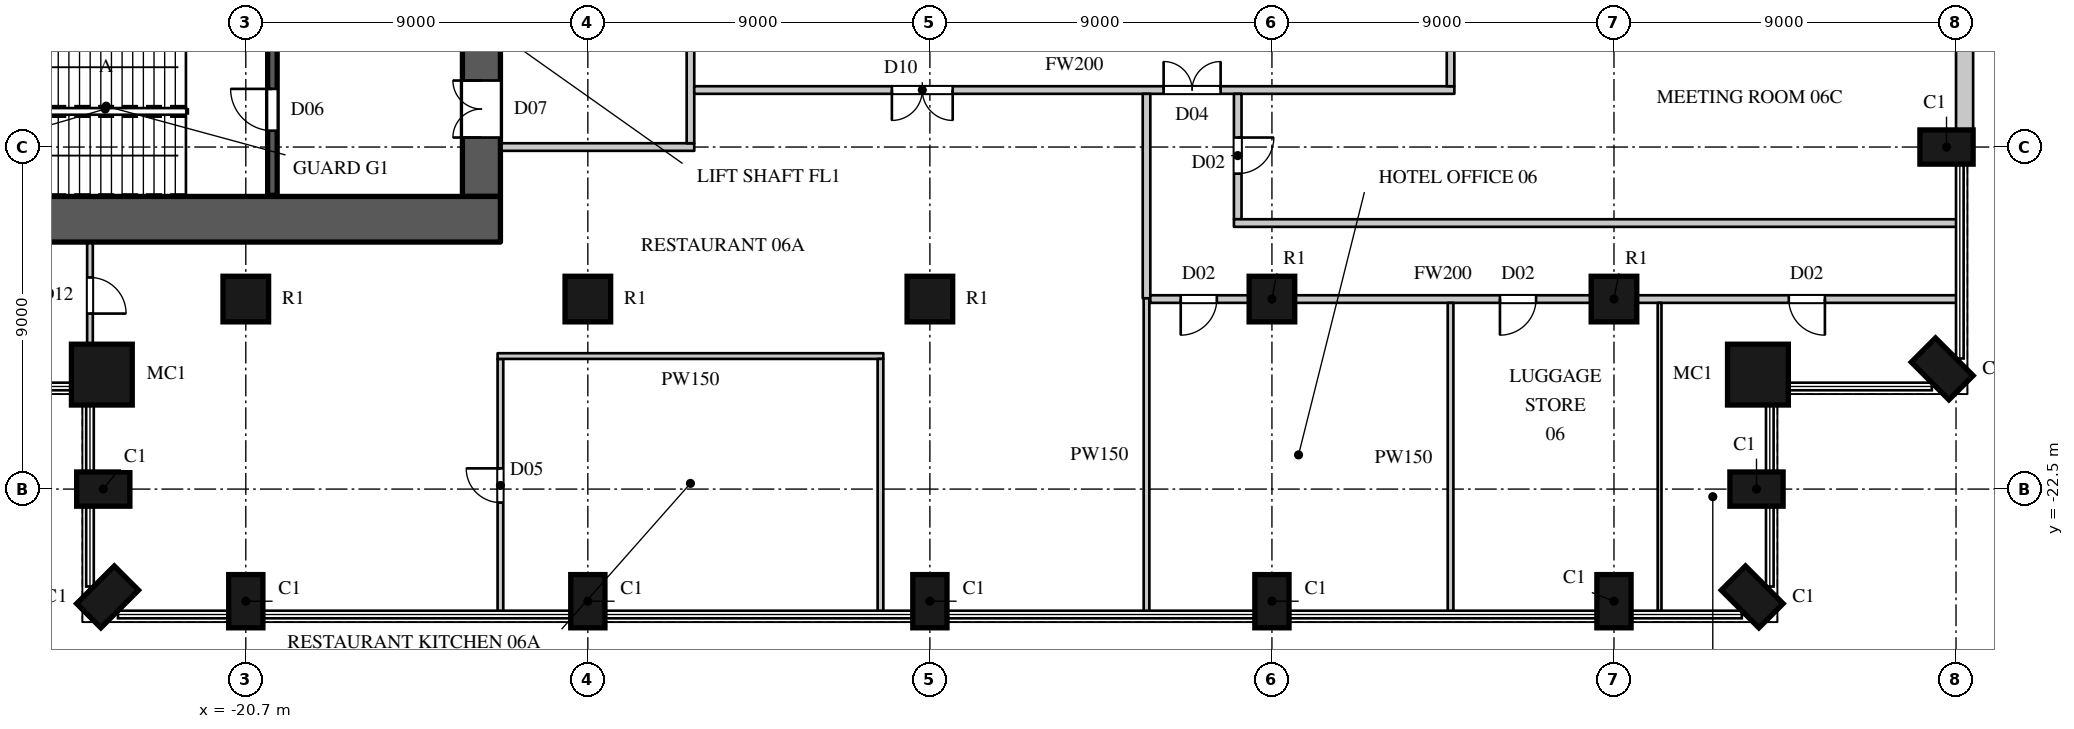
"""IFC4 building model, lengths in metres.
Left out: names, types, materials, properties, quantities, classifications, styles, units other than length and angle.
Written with IfcOpenShell. Run it as: python <this file> out.ifc"""

import sys

from ifc_helpers import new_model, si_unit, direction, frame, frame_2d, origin, origin_2d, place, context, subcontext, project, spatial, rectangle, circle, extrude, element, fill, save


model = new_model("IFC4")
c1 = context("Model", 3, precision=1e-05, world=origin(), true_north=direction((0.0, 1.0)))
c2 = subcontext(c1, "Body", "Model", "MODEL_VIEW")
j1 = project(units=[si_unit("LENGTHUNIT", "METRE"), si_unit("PLANEANGLEUNIT", "RADIAN")], contexts=[c1])
p1 = place(None, origin())
s1 = spatial("IfcSite", under=j1, at=p1, CompositionType="ELEMENT")
p2 = place(p1, origin())
s2 = spatial("IfcBuilding", under=s1, at=p2, CompositionType="ELEMENT")
p3 = place(p2, frame((0.0, 0.0, 50.0)))
s3 = spatial("IfcBuildingStorey", under=s2, at=p3, CompositionType="ELEMENT", Elevation=50.0)
p4 = place(p3, frame((-24.488, -19.488, 0.0), z_axis=(0.0, 0.0, 1.0), x_axis=(1.0, 0.0, 0.0)))
e1 = element("IfcColumn", 1, at=p4, inside=s3, PredefinedType="COLUMN", context=c2, shape_type="SweptSolid", body=[
    extrude(circle(Radius=0.8, at=origin_2d()), origin(), (0.0, 0.0, 1.0), 5.5),
])
for number, where, z_axis, x_axis in (
    (2, (-24.45, -22.5, 0.0), (0.0, 0.0, 1.0), (0.0, -1.0, 0.0)),
    (3, (-24.337, -25.337, 0.0), (0.0, 0.0, 1.0), (0.707, -0.707, 0.0)),
    (4, (-20.7, -25.45, 0.0), (0.0, 0.0, 1.0), (1.0, 0.0, 0.0)),
    (5, (-11.7, -25.45, 0.0), (0.0, 0.0, 1.0), (1.0, 0.0, 0.0)),
    (6, (-2.7, -25.45, 0.0), (0.0, 0.0, 1.0), (1.0, 0.0, 0.0)),
    (7, (6.3, -25.45, 0.0), (0.0, 0.0, 1.0), (1.0, 0.0, 0.0)),
    (8, (15.3, -25.45, 0.0), (0.0, 0.0, 1.0), (1.0, 0.0, 0.0)),
    (9, (18.937, -25.337, 0.0), (0.0, 0.0, 1.0), (0.707, 0.707, 0.0)),
    (10, (19.05, -22.5, 0.0), (0.0, 0.0, 1.0), (0.0, 1.0, 0.0)),
):
    element("IfcColumn", number, at=place(p3, frame(where, z_axis=z_axis, x_axis=x_axis)), inside=s3, PredefinedType="COLUMN", context=c2, shape_type="SweptSolid", body=[
        extrude(rectangle(XDim=0.9, YDim=1.4, at=origin_2d()), origin(), (0.0, 0.0, 1.0), 5.5),
    ])
p5 = place(p3, frame((19.088, -19.488, 0.0), z_axis=(0.0, 0.0, 1.0), x_axis=(1.0, 0.0, 0.0)))
e11 = element("IfcColumn", 11, at=p5, inside=s3, PredefinedType="COLUMN", context=c2, shape_type="SweptSolid", body=[
    extrude(circle(Radius=0.8, at=origin_2d()), origin(), (0.0, 0.0, 1.0), 5.5),
])
for number, where, z_axis, x_axis in (
    (12, (23.937, -19.337, 0.0), (0.0, 0.0, 1.0), (0.707, 0.707, 0.0)),
    (13, (24.05, -13.5, 0.0), (0.0, 0.0, 1.0), (0.0, 1.0, 0.0)),
):
    element("IfcColumn", number, at=place(p3, frame(where, z_axis=z_axis, x_axis=x_axis)), inside=s3, PredefinedType="COLUMN", context=c2, shape_type="SweptSolid", body=[
        extrude(rectangle(XDim=0.9, YDim=1.4, at=origin_2d()), origin(), (0.0, 0.0, 1.0), 5.5),
    ])
for number, where, z_axis, x_axis in (
    (14, (-20.7, -17.5, 0.0), (0.0, 0.0, 1.0), (1.0, 0.0, 0.0)),
    (15, (-11.7, -17.5, 0.0), (0.0, 0.0, 1.0), (1.0, 0.0, 0.0)),
    (16, (-2.7, -17.5, 0.0), (0.0, 0.0, 1.0), (1.0, 0.0, 0.0)),
    (17, (6.3, -17.5, 0.0), (0.0, 0.0, 1.0), (1.0, 0.0, 0.0)),
    (18, (15.3, -17.5, 0.0), (0.0, 0.0, 1.0), (1.0, 0.0, 0.0)),
):
    element("IfcColumn", number, at=place(p3, frame(where, z_axis=z_axis, x_axis=x_axis)), inside=s3, PredefinedType="COLUMN", context=c2, shape_type="SweptSolid", body=[
        extrude(circle(Radius=0.6, at=origin_2d()), origin(), (0.0, 0.0, 1.0), 5.5),
    ])
p6 = place(p3, frame((24.525, -13.05, 0.0), z_axis=(0.0, 0.0, 1.0), x_axis=(0.0, 1.0, 0.0)))
e19 = element("IfcWall", 19, at=p6, inside=s3, PredefinedType="SOLIDWALL", context=c2, shape_type="SweptSolid", body=[
    extrude(rectangle(XDim=8.1, YDim=0.45, at=frame_2d((4.05, 0.0))), origin(), (0.0, 0.0, 1.0), 5.2),
])
p7 = place(p6, frame((6.65, 0.0, 0.0)))
e20 = element("IfcOpeningElement", 20, at=p7, cuts=e19, PredefinedType="OPENING", context=c2, shape_type="SweptSolid", body=[
    extrude(rectangle(XDim=1.1, YDim=2.4, at=frame_2d((0.55, 1.2))), frame((0.0, 0.235, 0.0), z_axis=(0.0, -1.0, 0.0), x_axis=(1.0, 0.0, 0.0)), (0.0, 0.0, 1.0), 0.47),
])
p8 = place(p3, frame((-30.0, -15.4, 0.0), z_axis=(0.0, 0.0, 1.0), x_axis=(1.0, 0.0, 0.0)))
e21 = element("IfcWall", 21, at=p8, inside=s3, PredefinedType="SHEAR", context=c2, shape_type="SweptSolid", body=[
    extrude(rectangle(XDim=16.0, YDim=1.2, at=frame_2d((8.0, 0.0))), origin(), (0.0, 0.0, 1.0), 5.5),
])
p9 = place(p3, frame((-14.5, -14.8, 0.0), z_axis=(0.0, 0.0, 1.0), x_axis=(0.0, 1.0, 0.0)))
e22 = element("IfcWall", 22, at=p9, inside=s3, PredefinedType="SHEAR", context=c2, shape_type="SweptSolid", body=[
    extrude(rectangle(XDim=29.6, YDim=1.0, at=frame_2d((14.8, 0.0))), origin(), (0.0, 0.0, 1.0), 5.5),
])
p10 = place(p9, frame((1.55, 0.0, 0.0)))
e23 = element("IfcOpeningElement", 23, at=p10, cuts=e22, PredefinedType="OPENING", context=c2, shape_type="SweptSolid", body=[
    extrude(rectangle(XDim=1.5, YDim=2.4, at=frame_2d((0.75, 1.2))), frame((0.0, 0.51, 0.0), z_axis=(0.0, -1.0, 0.0), x_axis=(1.0, 0.0, 0.0)), (0.0, 0.0, 1.0), 1.02),
])
p11 = place(p9, frame((26.55, 0.0, 0.0)))
e24 = element("IfcOpeningElement", 24, at=p11, cuts=e22, PredefinedType="OPENING", context=c2, shape_type="SweptSolid", body=[
    extrude(rectangle(XDim=1.5, YDim=2.4, at=frame_2d((0.75, 1.2))), frame((0.0, 0.51, 0.0), z_axis=(0.0, -1.0, 0.0), x_axis=(1.0, 0.0, 0.0)), (0.0, 0.0, 1.0), 1.02),
])
p12 = place(p9, frame((8.45, 0.0, 0.0)))
e25 = element("IfcOpeningElement", 25, at=p12, cuts=e22, PredefinedType="OPENING", context=c2, shape_type="SweptSolid", body=[
    extrude(rectangle(XDim=1.5, YDim=2.4, at=frame_2d((0.75, 1.2))), frame((0.0, 0.51, 0.0), z_axis=(0.0, -1.0, 0.0), x_axis=(1.0, 0.0, 0.0)), (0.0, 0.0, 1.0), 1.02),
])
p13 = place(p9, frame((19.65, 0.0, 0.0)))
e26 = element("IfcOpeningElement", 26, at=p13, cuts=e22, PredefinedType="OPENING", context=c2, shape_type="SweptSolid", body=[
    extrude(rectangle(XDim=1.5, YDim=2.4, at=frame_2d((0.75, 1.2))), frame((0.0, 0.51, 0.0), z_axis=(0.0, -1.0, 0.0), x_axis=(1.0, 0.0, 0.0)), (0.0, 0.0, 1.0), 1.02),
])
p14 = place(p9, frame((14.5, 0.0, 0.0)))
e27 = element("IfcOpeningElement", 27, at=p14, cuts=e22, PredefinedType="OPENING", context=c2, shape_type="SweptSolid", body=[
    extrude(rectangle(XDim=0.6, YDim=2.0, at=frame_2d((0.3, 1.0))), frame((0.0, 0.51, 0.0), z_axis=(0.0, -1.0, 0.0), x_axis=(1.0, 0.0, 0.0)), (0.0, 0.0, 1.0), 1.02),
])
p15 = place(p3, frame((-13.97, -13.5, 0.0), z_axis=(0.0, 0.0, 1.0), x_axis=(1.0, 0.0, 0.0)))
e28 = element("IfcWall", 28, at=p15, inside=s3, PredefinedType="PARTITIONING", context=c2, shape_type="SweptSolid", body=[
    extrude(rectangle(XDim=5.07, YDim=0.2, at=frame_2d((2.535, 0.0))), origin(), (0.0, 0.0, 1.0), 5.2),
])
p16 = place(p3, frame((-9.0, -13.4, 0.0), z_axis=(0.0, 0.0, 1.0), x_axis=(0.0, 1.0, 0.0)))
e29 = element("IfcWall", 29, at=p16, inside=s3, PredefinedType="PARTITIONING", context=c2, shape_type="SweptSolid", body=[
    extrude(rectangle(XDim=26.8, YDim=0.2, at=frame_2d((13.4, 0.0))), origin(), (0.0, 0.0, 1.0), 5.2),
])
p17 = place(p16, frame((12.6, 0.0, 0.0)))
e30 = element("IfcOpeningElement", 30, at=p17, cuts=e29, PredefinedType="OPENING", context=c2, shape_type="SweptSolid", body=[
    extrude(rectangle(XDim=1.6, YDim=2.4, at=frame_2d((0.8, 1.2))), frame((0.0, 0.11, 0.0), z_axis=(0.0, -1.0, 0.0), x_axis=(1.0, 0.0, 0.0)), (0.0, 0.0, 1.0), 0.22),
])
p18 = place(p3, frame((-8.9, -12.0, 0.0), z_axis=(0.0, 0.0, 1.0), x_axis=(1.0, 0.0, 0.0)))
e31 = element("IfcWall", 31, at=p18, inside=s3, PredefinedType="PARTITIONING", context=c2, shape_type="SweptSolid", body=[
    extrude(rectangle(XDim=20.0, YDim=0.2, at=frame_2d((10.0, 0.0))), origin(), (0.0, 0.0, 1.0), 5.2),
])
p19 = place(p18, frame((5.2, 0.0, 0.0)))
e32 = element("IfcOpeningElement", 32, at=p19, cuts=e31, PredefinedType="OPENING", context=c2, shape_type="SweptSolid", body=[
    extrude(rectangle(XDim=1.6, YDim=2.4, at=frame_2d((0.8, 1.2))), frame((0.0, 0.11, 0.0), z_axis=(0.0, -1.0, 0.0), x_axis=(1.0, 0.0, 0.0)), (0.0, 0.0, 1.0), 0.22),
])
p20 = place(p18, frame((12.35, 0.0, 0.0)))
e33 = element("IfcOpeningElement", 33, at=p20, cuts=e31, PredefinedType="OPENING", context=c2, shape_type="SweptSolid", body=[
    extrude(rectangle(XDim=1.5, YDim=2.2, at=frame_2d((0.75, 1.1))), frame((0.0, 0.11, 0.0), z_axis=(0.0, -1.0, 0.0), x_axis=(1.0, 0.0, 0.0)), (0.0, 0.0, 1.0), 0.22),
])
p21 = place(p3, frame((3.0, -17.48, 0.0), z_axis=(0.0, 0.0, 1.0), x_axis=(0.0, 1.0, 0.0)))
e34 = element("IfcWall", 34, at=p21, inside=s3, PredefinedType="PARTITIONING", context=c2, shape_type="SweptSolid", body=[
    extrude(rectangle(XDim=5.38, YDim=0.2, at=frame_2d((2.69, 0.0))), origin(), (0.0, 0.0, 1.0), 5.2),
])
p22 = place(p3, frame((3.1, -17.5, 0.0), z_axis=(0.0, 0.0, 1.0), x_axis=(1.0, 0.0, 0.0)))
e35 = element("IfcWall", 35, at=p22, inside=s3, PredefinedType="PARTITIONING", context=c2, shape_type="SweptSolid", body=[
    extrude(rectangle(XDim=2.6, YDim=0.2, at=frame_2d((1.3, 0.0))), origin(), (0.0, 0.0, 1.0), 4.65),
])
p23 = place(p22, frame((0.8, 0.0, 0.0)))
e36 = element("IfcOpeningElement", 36, at=p23, cuts=e35, PredefinedType="OPENING", context=c2, shape_type="SweptSolid", body=[
    extrude(rectangle(XDim=0.95, YDim=2.2, at=frame_2d((0.475, 1.1))), frame((0.0, 0.11, 0.0), z_axis=(0.0, -1.0, 0.0), x_axis=(1.0, 0.0, 0.0)), (0.0, 0.0, 1.0), 0.22),
])
p24 = place(p3, frame((6.9, -17.5, 0.0), z_axis=(0.0, 0.0, 1.0), x_axis=(1.0, 0.0, 0.0)))
e37 = element("IfcWall", 37, at=p24, inside=s3, PredefinedType="PARTITIONING", context=c2, shape_type="SweptSolid", body=[
    extrude(rectangle(XDim=7.8, YDim=0.2, at=frame_2d((3.9, 0.0))), origin(), (0.0, 0.0, 1.0), 4.65),
])
p25 = place(p24, frame((5.4, 0.0, 0.0)))
e38 = element("IfcOpeningElement", 38, at=p25, cuts=e37, PredefinedType="OPENING", context=c2, shape_type="SweptSolid", body=[
    extrude(rectangle(XDim=0.95, YDim=2.2, at=frame_2d((0.475, 1.1))), frame((0.0, 0.11, 0.0), z_axis=(0.0, -1.0, 0.0), x_axis=(1.0, 0.0, 0.0)), (0.0, 0.0, 1.0), 0.22),
])
p26 = place(p3, frame((15.9, -17.5, 0.0), z_axis=(0.0, 0.0, 1.0), x_axis=(1.0, 0.0, 0.0)))
e39 = element("IfcWall", 39, at=p26, inside=s3, PredefinedType="PARTITIONING", context=c2, shape_type="SweptSolid", body=[
    extrude(rectangle(XDim=8.455, YDim=0.2, at=frame_2d((4.228, 0.0))), origin(), (0.0, 0.0, 1.0), 5.2),
])
p27 = place(p26, frame((4.0, 0.0, 0.0)))
e40 = element("IfcOpeningElement", 40, at=p27, cuts=e39, PredefinedType="OPENING", context=c2, shape_type="SweptSolid", body=[
    extrude(rectangle(XDim=0.95, YDim=2.2, at=frame_2d((0.475, 1.1))), frame((0.0, 0.11, 0.0), z_axis=(0.0, -1.0, 0.0), x_axis=(1.0, 0.0, 0.0)), (0.0, 0.0, 1.0), 0.22),
])
p28 = place(p3, frame((5.4, -15.4, 0.0), z_axis=(0.0, 0.0, 1.0), x_axis=(0.0, 1.0, 0.0)))
e41 = element("IfcWall", 41, at=p28, inside=s3, PredefinedType="PARTITIONING", context=c2, shape_type="SweptSolid", body=[
    extrude(rectangle(XDim=3.3, YDim=0.2, at=frame_2d((1.65, 0.0))), origin(), (0.0, 0.0, 1.0), 5.2),
])
p29 = place(p28, frame((1.2, 0.0, 0.0)))
e42 = element("IfcOpeningElement", 42, at=p29, cuts=e41, PredefinedType="OPENING", context=c2, shape_type="SweptSolid", body=[
    extrude(rectangle(XDim=0.95, YDim=2.2, at=frame_2d((0.475, 1.1))), frame((0.0, 0.11, 0.0), z_axis=(0.0, -1.0, 0.0), x_axis=(1.0, 0.0, 0.0)), (0.0, 0.0, 1.0), 0.22),
])
p30 = place(p3, frame((5.3, -15.5, 0.0), z_axis=(0.0, 0.0, 1.0), x_axis=(1.0, 0.0, 0.0)))
e43 = element("IfcWall", 43, at=p30, inside=s3, PredefinedType="PARTITIONING", context=c2, shape_type="SweptSolid", body=[
    extrude(rectangle(XDim=19.055, YDim=0.2, at=frame_2d((9.527, 0.0))), origin(), (0.0, 0.0, 1.0), 5.2),
])
p31 = place(p3, frame((11.0, -11.9, 0.0), z_axis=(0.0, 0.0, 1.0), x_axis=(0.0, 1.0, 0.0)))
e44 = element("IfcWall", 44, at=p31, inside=s3, PredefinedType="PARTITIONING", context=c2, shape_type="SweptSolid", body=[
    extrude(rectangle(XDim=23.9, YDim=0.2, at=frame_2d((11.95, 0.0))), origin(), (0.0, 0.0, 1.0), 5.2),
])
p32 = place(p31, frame((21.55, 0.0, 0.0)))
e45 = element("IfcOpeningElement", 45, at=p32, cuts=e44, PredefinedType="OPENING", context=c2, shape_type="SweptSolid", body=[
    extrude(rectangle(XDim=1.6, YDim=2.4, at=frame_2d((0.8, 1.2))), frame((0.0, 0.11, 0.0), z_axis=(0.0, -1.0, 0.0), x_axis=(1.0, 0.0, 0.0)), (0.0, 0.0, 1.0), 0.22),
])
p33 = place(p31, frame((11.1, 0.0, 0.0)))
e46 = element("IfcOpeningElement", 46, at=p33, cuts=e44, PredefinedType="OPENING", context=c2, shape_type="SweptSolid", body=[
    extrude(rectangle(XDim=1.6, YDim=2.4, at=frame_2d((0.8, 1.2))), frame((0.0, 0.11, 0.0), z_axis=(0.0, -1.0, 0.0), x_axis=(1.0, 0.0, 0.0)), (0.0, 0.0, 1.0), 0.22),
])
p34 = place(p3, frame((-24.8, -18.732, 0.0), z_axis=(0.0, 0.0, 1.0), x_axis=(0.0, 1.0, 0.0)))
e47 = element("IfcWall", 47, at=p34, inside=s3, PredefinedType="PARTITIONING", context=c2, shape_type="SweptSolid", body=[
    extrude(rectangle(XDim=2.702, YDim=0.15, at=frame_2d((1.351, 0.0))), origin(), (0.0, 0.0, 1.0), 5.2),
])
p35 = place(p34, frame((0.85, 0.0, 0.0)))
e48 = element("IfcOpeningElement", 48, at=p35, cuts=e47, PredefinedType="OPENING", context=c2, shape_type="SweptSolid", body=[
    extrude(rectangle(XDim=0.95, YDim=2.2, at=frame_2d((0.475, 1.1))), frame((0.0, 0.085, 0.0), z_axis=(0.0, -1.0, 0.0), x_axis=(1.0, 0.0, 0.0)), (0.0, 0.0, 1.0), 0.17),
])
p36 = place(p3, frame((-14.0, -25.755, 0.0), z_axis=(0.0, 0.0, 1.0), x_axis=(0.0, 1.0, 0.0)))
e49 = element("IfcWall", 49, at=p36, inside=s3, PredefinedType="PARTITIONING", context=c2, shape_type="SweptSolid", body=[
    extrude(rectangle(XDim=6.68, YDim=0.15, at=frame_2d((3.34, 0.0))), origin(), (0.0, 0.0, 1.0), 5.2),
])
p37 = place(p36, frame((2.9, 0.0, 0.0)))
e50 = element("IfcOpeningElement", 50, at=p37, cuts=e49, PredefinedType="OPENING", context=c2, shape_type="SweptSolid", body=[
    extrude(rectangle(XDim=0.9, YDim=2.2, at=frame_2d((0.45, 1.1))), frame((0.0, 0.085, 0.0), z_axis=(0.0, -1.0, 0.0), x_axis=(1.0, 0.0, 0.0)), (0.0, 0.0, 1.0), 0.17),
])
p38 = place(p3, frame((-14.075, -19.0, 0.0), z_axis=(0.0, 0.0, 1.0), x_axis=(1.0, 0.0, 0.0)))
e51 = element("IfcWall", 51, at=p38, inside=s3, PredefinedType="PARTITIONING", context=c2, shape_type="SweptSolid", body=[
    extrude(rectangle(XDim=10.15, YDim=0.15, at=frame_2d((5.075, 0.0))), origin(), (0.0, 0.0, 1.0), 5.2),
])
p39 = place(p3, frame((-4.0, -25.755, 0.0), z_axis=(0.0, 0.0, 1.0), x_axis=(0.0, 1.0, 0.0)))
e52 = element("IfcWall", 52, at=p39, inside=s3, PredefinedType="PARTITIONING", context=c2, shape_type="SweptSolid", body=[
    extrude(rectangle(XDim=6.68, YDim=0.15, at=frame_2d((3.34, 0.0))), origin(), (0.0, 0.0, 1.0), 5.2),
])
p40 = place(p3, frame((3.0, -25.755, 0.0), z_axis=(0.0, 0.0, 1.0), x_axis=(0.0, 1.0, 0.0)))
e53 = element("IfcWall", 53, at=p40, inside=s3, PredefinedType="PARTITIONING", context=c2, shape_type="SweptSolid", body=[
    extrude(rectangle(XDim=8.275, YDim=0.15, at=frame_2d((4.137, 0.0))), origin(), (0.0, 0.0, 1.0), 5.2),
])
p41 = place(p3, frame((11.0, -25.755, 0.0), z_axis=(0.0, 0.0, 1.0), x_axis=(0.0, 1.0, 0.0)))
e54 = element("IfcWall", 54, at=p41, inside=s3, PredefinedType="PARTITIONING", context=c2, shape_type="SweptSolid", body=[
    extrude(rectangle(XDim=8.155, YDim=0.15, at=frame_2d((4.077, 0.0))), origin(), (0.0, 0.0, 1.0), 4.55),
])
p42 = place(p3, frame((-20.0, -14.77, 0.0), z_axis=(0.0, 0.0, 1.0), x_axis=(0.0, 1.0, 0.0)))
e55 = element("IfcWall", 55, at=p42, inside=s3, PredefinedType="SHEAR", context=c2, shape_type="SweptSolid", body=[
    extrude(rectangle(XDim=4.445, YDim=0.25, at=frame_2d((2.223, 0.0))), origin(), (0.0, 0.0, 1.0), 5.2),
])
p43 = place(p42, frame((1.7, 0.0, 0.0)))
e56 = element("IfcOpeningElement", 56, at=p43, cuts=e55, PredefinedType="OPENING", context=c2, shape_type="SweptSolid", body=[
    extrude(rectangle(XDim=1.1, YDim=2.2, at=frame_2d((0.55, 1.1))), frame((0.0, 0.135, 0.0), z_axis=(0.0, -1.0, 0.0), x_axis=(1.0, 0.0, 0.0)), (0.0, 0.0, 1.0), 0.27),
])
p44 = place(p3, frame((16.5, -25.755, 0.0), z_axis=(0.0, 0.0, 1.0), x_axis=(0.0, 1.0, 0.0)))
e57 = element("IfcWall", 57, at=p44, inside=s3, PredefinedType="PARTITIONING", context=c2, shape_type="SweptSolid", body=[
    extrude(rectangle(XDim=8.155, YDim=0.1, at=frame_2d((4.077, 0.0))), origin(), (0.0, 0.0, 1.0), 5.2),
])
p45 = place(p43, origin())
e58 = element("IfcDoor", 58, at=p45, inside=s3, OperationType="SINGLE_SWING_RIGHT", PredefinedType="DOOR", context=c2, shape_type="SweptSolid", body=[
    extrude(rectangle(XDim=1.1, YDim=2.2, at=frame_2d((0.55, 1.1))), frame((0.0, 0.025, 0.0), z_axis=(0.0, -1.0, 0.0), x_axis=(1.0, 0.0, 0.0)), (0.0, 0.0, 1.0), 0.05),
])
fill(e56, e58)
p46 = place(p19, origin())
e59 = element("IfcDoor", 59, at=p46, inside=s3, OperationType="DOUBLE_DOOR_SINGLE_SWING", PredefinedType="DOOR", context=c2, shape_type="SweptSolid", body=[
    extrude(rectangle(XDim=1.6, YDim=2.4, at=frame_2d((0.8, 1.2))), frame((0.0, 0.025, 0.0), z_axis=(0.0, -1.0, 0.0), x_axis=(1.0, 0.0, 0.0)), (0.0, 0.0, 1.0), 0.05),
])
fill(e32, e59)
p47 = place(p37, origin())
e60 = element("IfcDoor", 60, at=p47, inside=s3, OperationType="SINGLE_SWING_RIGHT", PredefinedType="DOOR", context=c2, shape_type="SweptSolid", body=[
    extrude(rectangle(XDim=0.9, YDim=2.2, at=frame_2d((0.45, 1.1))), frame((0.0, 0.025, 0.0), z_axis=(0.0, -1.0, 0.0), x_axis=(1.0, 0.0, 0.0)), (0.0, 0.0, 1.0), 0.05),
])
fill(e50, e60)
p48 = place(p20, origin())
e61 = element("IfcDoor", 61, at=p48, inside=s3, OperationType="DOUBLE_DOOR_SINGLE_SWING", PredefinedType="DOOR", context=c2, shape_type="SweptSolid", body=[
    extrude(rectangle(XDim=1.5, YDim=2.2, at=frame_2d((0.75, 1.1))), frame((0.0, 0.025, 0.0), z_axis=(0.0, -1.0, 0.0), x_axis=(1.0, 0.0, 0.0)), (0.0, 0.0, 1.0), 0.05),
])
fill(e33, e61)
p49 = place(p29, origin())
e62 = element("IfcDoor", 62, at=p49, inside=s3, OperationType="SINGLE_SWING_LEFT", PredefinedType="DOOR", context=c2, shape_type="SweptSolid", body=[
    extrude(rectangle(XDim=0.95, YDim=2.2, at=frame_2d((0.475, 1.1))), frame((0.0, 0.025, 0.0), z_axis=(0.0, -1.0, 0.0), x_axis=(1.0, 0.0, 0.0)), (0.0, 0.0, 1.0), 0.05),
])
fill(e42, e62)
p50 = place(p23, origin())
e63 = element("IfcDoor", 63, at=p50, inside=s3, OperationType="SINGLE_SWING_RIGHT", PredefinedType="DOOR", context=c2, shape_type="SweptSolid", body=[
    extrude(rectangle(XDim=0.95, YDim=2.2, at=frame_2d((0.475, 1.1))), frame((0.0, 0.025, 0.0), z_axis=(0.0, -1.0, 0.0), x_axis=(1.0, 0.0, 0.0)), (0.0, 0.0, 1.0), 0.05),
])
fill(e36, e63)
p51 = place(p25, origin())
e64 = element("IfcDoor", 64, at=p51, inside=s3, OperationType="SINGLE_SWING_RIGHT", PredefinedType="DOOR", context=c2, shape_type="SweptSolid", body=[
    extrude(rectangle(XDim=0.95, YDim=2.2, at=frame_2d((0.475, 1.1))), frame((0.0, 0.025, 0.0), z_axis=(0.0, -1.0, 0.0), x_axis=(1.0, 0.0, 0.0)), (0.0, 0.0, 1.0), 0.05),
])
fill(e38, e64)
p52 = place(p27, origin())
e65 = element("IfcDoor", 65, at=p52, inside=s3, OperationType="SINGLE_SWING_LEFT", PredefinedType="DOOR", context=c2, shape_type="SweptSolid", body=[
    extrude(rectangle(XDim=0.95, YDim=2.2, at=frame_2d((0.475, 1.1))), frame((0.0, 0.025, 0.0), z_axis=(0.0, -1.0, 0.0), x_axis=(1.0, 0.0, 0.0)), (0.0, 0.0, 1.0), 0.05),
])
fill(e40, e65)
p53 = place(p35, origin())
e66 = element("IfcDoor", 66, at=p53, inside=s3, OperationType="SINGLE_SWING_RIGHT", PredefinedType="DOOR", context=c2, shape_type="SweptSolid", body=[
    extrude(rectangle(XDim=0.95, YDim=2.2, at=frame_2d((0.475, 1.1))), frame((0.0, 0.025, 0.0), z_axis=(0.0, -1.0, 0.0), x_axis=(1.0, 0.0, 0.0)), (0.0, 0.0, 1.0), 0.05),
])
fill(e48, e66)
p54 = place(p10, origin())
e67 = element("IfcDoor", 67, at=p54, inside=s3, OperationType="DOUBLE_DOOR_SINGLE_SWING", PredefinedType="DOOR", context=c2, shape_type="SweptSolid", body=[
    extrude(rectangle(XDim=1.5, YDim=2.4, at=frame_2d((0.75, 1.2))), frame((0.0, 0.495, 0.0), z_axis=(0.0, -1.0, 0.0), x_axis=(1.0, 0.0, 0.0)), (0.0, 0.0, 1.0), 0.05),
])
fill(e23, e67)
save(model, sys.argv[1])
